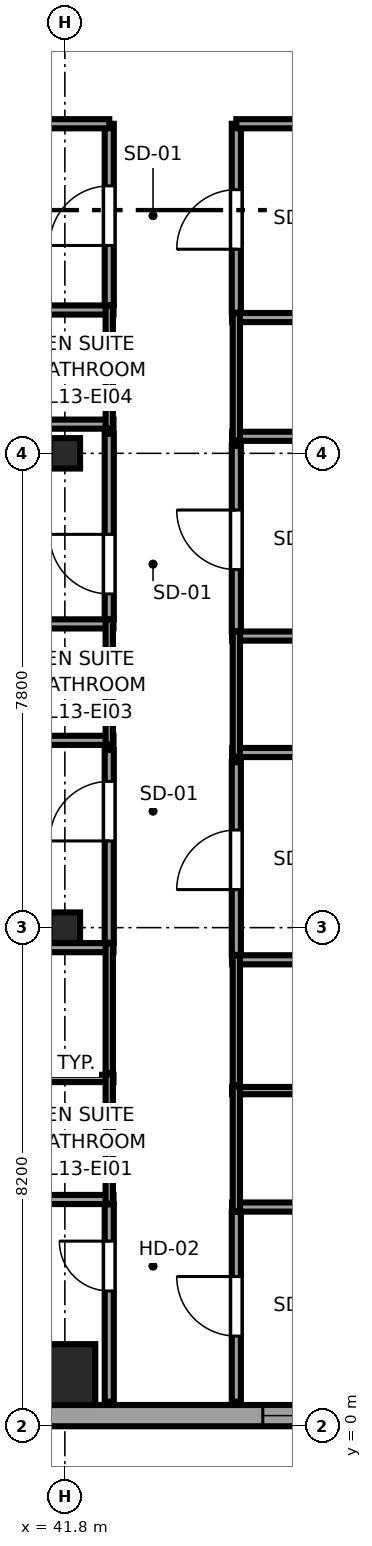
"""IFC4 building model, lengths in metres.
Left out: names, types, materials, properties, quantities, classifications, styles, units other than length and angle.
Written with IfcOpenShell. Run it as: python <this file> out.ifc"""

import sys

from ifc_helpers import new_model, si_unit, direction, frame, frame_2d, origin, origin_2d, place, context, subcontext, project, spatial, rectangle, i_section, extrude, source, transform, mapped, element, fill, save


model = new_model("IFC4")
c1 = context("Model", 3, precision=1e-05, world=origin(), true_north=direction((0.0, 1.0)))
c2 = subcontext(c1, "Body", "Model", "MODEL_VIEW")
j1 = project(units=[si_unit("LENGTHUNIT", "METRE"), si_unit("PLANEANGLEUNIT", "RADIAN")], contexts=[c1])
p1 = place(None, origin())
s1 = spatial("IfcSite", under=j1, at=p1, CompositionType="ELEMENT")
p2 = place(p1, origin())
s2 = spatial("IfcBuilding", under=s1, at=p2, CompositionType="ELEMENT")
p3 = place(p2, frame((0.0, 0.0, 56.85)))
s3 = spatial("IfcBuildingStorey", under=s2, at=p3, CompositionType="ELEMENT", Elevation=56.85)
m1 = source(origin(), c2, "Body", "SweptSolid", [
    extrude(rectangle(XDim=1.0, YDim=1.0, at=origin_2d()), origin(), (0.0, 0.0, 1.0), 3.55),
])
p4 = place(p3, frame((41.8, 0.85, 0.0), z_axis=(0.0, 0.0, 1.0), x_axis=(1.0, 0.0, 0.0)))
e1 = element("IfcColumn", 1, at=p4, inside=s3, PredefinedType="COLUMN", context=c2, shape_type="MappedRepresentation", body=[
    mapped(m1, transform((0.0, 0.0, 0.0), x_axis=(1.0, 0.0, 0.0), y_axis=(0.0, 1.0, 0.0), z_axis=(0.0, 0.0, 1.0), scale=1.0)),
])
m2 = source(origin(), c2, "Body", "SweptSolid", [
    extrude(i_section(OverallWidth=0.5, OverallDepth=0.5, WebThickness=0.028, FlangeThickness=0.045, at=origin_2d()), origin(), (0.0, 0.0, 1.0), 3.55),
])
for number, where, z_axis, x_axis in (
    (2, (41.8, 8.2, 0.0), (0.0, 0.0, 1.0), (1.0, 0.0, 0.0)),
    (3, (41.8, 16.0, 0.0), (0.0, 0.0, 1.0), (1.0, 0.0, 0.0)),
):
    element("IfcColumn", number, at=place(p3, frame(where, z_axis=z_axis, x_axis=x_axis)), inside=s3, PredefinedType="COLUMN", context=c2, shape_type="MappedRepresentation", body=[
        mapped(m2, transform((0.0, 0.0, 0.0), x_axis=(1.0, 0.0, 0.0), y_axis=(0.0, 1.0, 0.0), z_axis=(0.0, 0.0, 1.0), scale=1.0)),
    ])
p5 = place(p3, frame((34.375, 0.175, 0.0), z_axis=(0.0, 0.0, 1.0), x_axis=(1.0, 0.0, 0.0)))
e4 = element("IfcWall", 4, at=p5, inside=s3, PredefinedType="SOLIDWALL", context=c2, shape_type="SweptSolid", body=[
    extrude(rectangle(XDim=18.008, YDim=0.35, at=frame_2d((9.004, 0.0))), origin(), (0.0, 0.0, 1.0), 3.37),
])
p6 = place(p5, frame((1.726, 0.0, 0.68)))
e5 = element("IfcOpeningElement", 5, at=p6, cuts=e4, PredefinedType="OPENING", context=c2, shape_type="SweptSolid", body=[
    extrude(rectangle(XDim=1.95, YDim=1.82, at=frame_2d((0.975, 0.91))), frame((0.0, 0.185, 0.0), z_axis=(0.0, -1.0, 0.0), x_axis=(1.0, 0.0, 0.0)), (0.0, 0.0, 1.0), 0.37),
])
p7 = place(p5, frame((10.68, 0.0, 0.68)))
e6 = element("IfcOpeningElement", 6, at=p7, cuts=e4, PredefinedType="OPENING", context=c2, shape_type="SweptSolid", body=[
    extrude(rectangle(XDim=1.95, YDim=1.82, at=frame_2d((0.975, 0.91))), frame((0.0, 0.185, 0.0), z_axis=(0.0, -1.0, 0.0), x_axis=(1.0, 0.0, 0.0)), (0.0, 0.0, 1.0), 0.37),
])
p8 = place(p3, frame((40.01, 3.729, 0.0), z_axis=(0.0, 0.0, 1.0), x_axis=(1.0, 0.0, 0.0)))
e7 = element("IfcWall", 7, at=p8, inside=s3, PredefinedType="PARTITIONING", context=c2, shape_type="SweptSolid", body=[
    extrude(rectangle(XDim=2.59, YDim=0.15, at=frame_2d((1.295, 0.0))), origin(), (0.0, 0.0, 1.0), 3.37),
])
p9 = place(p3, frame((40.01, 5.72, 0.0), z_axis=(0.0, 0.0, 1.0), x_axis=(1.0, 0.0, 0.0)))
e8 = element("IfcWall", 8, at=p9, inside=s3, PredefinedType="PLUMBINGWALL", context=c2, shape_type="SweptSolid", body=[
    extrude(rectangle(XDim=2.59, YDim=0.12, at=frame_2d((1.295, 0.0))), origin(), (0.0, 0.0, 1.0), 3.37),
])
p10 = place(p3, frame((42.53, 3.659, 0.0), z_axis=(0.0, 0.0, 1.0), x_axis=(0.0, 1.0, 0.0)))
e9 = element("IfcWall", 9, at=p10, inside=s3, PredefinedType="PLUMBINGWALL", context=c2, shape_type="SweptSolid", body=[
    extrude(rectangle(XDim=2.131, YDim=0.12, at=frame_2d((1.065, 0.0))), origin(), (0.0, 0.0, 1.0), 3.37),
])
p11 = place(p3, frame((40.01, 7.871, 0.0), z_axis=(0.0, 0.0, 1.0), x_axis=(1.0, 0.0, 0.0)))
e10 = element("IfcWall", 10, at=p11, inside=s3, PredefinedType="PARTITIONING", context=c2, shape_type="SweptSolid", body=[
    extrude(rectangle(XDim=2.59, YDim=0.15, at=frame_2d((1.295, 0.0))), origin(), (0.0, 0.0, 1.0), 3.37),
])
p12 = place(p3, frame((42.53, 5.81, 0.0), z_axis=(0.0, 0.0, 1.0), x_axis=(0.0, 1.0, 0.0)))
e11 = element("IfcWall", 11, at=p12, inside=s3, PredefinedType="PLUMBINGWALL", context=c2, shape_type="SweptSolid", body=[
    extrude(rectangle(XDim=2.131, YDim=0.12, at=frame_2d((1.065, 0.0))), origin(), (0.0, 0.0, 1.0), 3.37),
])
p13 = place(p3, frame((34.65, 11.28, 0.0), z_axis=(0.0, 0.0, 1.0), x_axis=(1.0, 0.0, 0.0)))
e12 = element("IfcWall", 12, at=p13, inside=s3, PredefinedType="PARTITIONING", context=c2, shape_type="SweptSolid", body=[
    extrude(rectangle(XDim=7.95, YDim=0.15, at=frame_2d((3.975, 0.0))), origin(), (0.0, 0.0, 1.0), 3.37),
])
p14 = place(p3, frame((40.01, 13.195, 0.0), z_axis=(0.0, 0.0, 1.0), x_axis=(1.0, 0.0, 0.0)))
e13 = element("IfcWall", 13, at=p14, inside=s3, PredefinedType="PARTITIONING", context=c2, shape_type="SweptSolid", body=[
    extrude(rectangle(XDim=2.59, YDim=0.15, at=frame_2d((1.295, 0.0))), origin(), (0.0, 0.0, 1.0), 3.37),
])
p15 = place(p3, frame((42.53, 11.21, 0.0), z_axis=(0.0, 0.0, 1.0), x_axis=(0.0, 1.0, 0.0)))
e14 = element("IfcWall", 14, at=p15, inside=s3, PredefinedType="PLUMBINGWALL", context=c2, shape_type="SweptSolid", body=[
    extrude(rectangle(XDim=2.055, YDim=0.12, at=frame_2d((1.027, 0.0))), origin(), (0.0, 0.0, 1.0), 3.37),
])
p16 = place(p3, frame((34.65, 16.48, 0.0), z_axis=(0.0, 0.0, 1.0), x_axis=(1.0, 0.0, 0.0)))
e15 = element("IfcWall", 15, at=p16, inside=s3, PredefinedType="PARTITIONING", context=c2, shape_type="SweptSolid", body=[
    extrude(rectangle(XDim=7.95, YDim=0.15, at=frame_2d((3.975, 0.0))), origin(), (0.0, 0.0, 1.0), 3.37),
])
p17 = place(p3, frame((40.01, 18.357, 0.0), z_axis=(0.0, 0.0, 1.0), x_axis=(1.0, 0.0, 0.0)))
e16 = element("IfcWall", 16, at=p17, inside=s3, PredefinedType="PARTITIONING", context=c2, shape_type="SweptSolid", body=[
    extrude(rectangle(XDim=2.59, YDim=0.15, at=frame_2d((1.295, 0.0))), origin(), (0.0, 0.0, 1.0), 3.37),
])
p18 = place(p3, frame((42.53, 16.41, 0.0), z_axis=(0.0, 0.0, 1.0), x_axis=(0.0, 1.0, 0.0)))
e17 = element("IfcWall", 17, at=p18, inside=s3, PredefinedType="PLUMBINGWALL", context=c2, shape_type="SweptSolid", body=[
    extrude(rectangle(XDim=2.017, YDim=0.12, at=frame_2d((1.009, 0.0))), origin(), (0.0, 0.0, 1.0), 3.37),
])
p19 = place(p3, frame((44.55, 3.605, 0.0), z_axis=(0.0, 0.0, 1.0), x_axis=(1.0, 0.0, 0.0)))
e18 = element("IfcWall", 18, at=p19, inside=s3, PredefinedType="PARTITIONING", context=c2, shape_type="SweptSolid", body=[
    extrude(rectangle(XDim=2.59, YDim=0.15, at=frame_2d((1.295, 0.0))), origin(), (0.0, 0.0, 1.0), 3.37),
])
p20 = place(p3, frame((44.55, 5.52, 0.0), z_axis=(0.0, 0.0, 1.0), x_axis=(1.0, 0.0, 0.0)))
e19 = element("IfcWall", 19, at=p20, inside=s3, PredefinedType="PLUMBINGWALL", context=c2, shape_type="SweptSolid", body=[
    extrude(rectangle(XDim=2.59, YDim=0.12, at=frame_2d((1.295, 0.0))), origin(), (0.0, 0.0, 1.0), 3.37),
])
p21 = place(p3, frame((44.62, 3.535, 0.0), z_axis=(0.0, 0.0, 1.0), x_axis=(0.0, 1.0, 0.0)))
e20 = element("IfcWall", 20, at=p21, inside=s3, PredefinedType="PLUMBINGWALL", context=c2, shape_type="SweptSolid", body=[
    extrude(rectangle(XDim=2.055, YDim=0.12, at=frame_2d((1.028, 0.0))), origin(), (0.0, 0.0, 1.0), 3.37),
])
p22 = place(p3, frame((44.55, 7.671, 0.0), z_axis=(0.0, 0.0, 1.0), x_axis=(1.0, 0.0, 0.0)))
e21 = element("IfcWall", 21, at=p22, inside=s3, PredefinedType="PARTITIONING", context=c2, shape_type="SweptSolid", body=[
    extrude(rectangle(XDim=2.59, YDim=0.15, at=frame_2d((1.295, 0.0))), origin(), (0.0, 0.0, 1.0), 3.37),
])
p23 = place(p3, frame((44.62, 5.61, 0.0), z_axis=(0.0, 0.0, 1.0), x_axis=(0.0, 1.0, 0.0)))
e22 = element("IfcWall", 22, at=p23, inside=s3, PredefinedType="PLUMBINGWALL", context=c2, shape_type="SweptSolid", body=[
    extrude(rectangle(XDim=2.131, YDim=0.12, at=frame_2d((1.065, 0.0))), origin(), (0.0, 0.0, 1.0), 3.37),
])
p24 = place(p3, frame((44.55, 11.08, 0.0), z_axis=(0.0, 0.0, 1.0), x_axis=(1.0, 0.0, 0.0)))
e23 = element("IfcWall", 23, at=p24, inside=s3, PredefinedType="PARTITIONING", context=c2, shape_type="SweptSolid", body=[
    extrude(rectangle(XDim=12.045, YDim=0.15, at=frame_2d((6.022, 0.0))), origin(), (0.0, 0.0, 1.0), 3.37),
])
p25 = place(p3, frame((44.55, 12.995, 0.0), z_axis=(0.0, 0.0, 1.0), x_axis=(1.0, 0.0, 0.0)))
e24 = element("IfcWall", 24, at=p25, inside=s3, PredefinedType="PARTITIONING", context=c2, shape_type="SweptSolid", body=[
    extrude(rectangle(XDim=2.59, YDim=0.15, at=frame_2d((1.295, 0.0))), origin(), (0.0, 0.0, 1.0), 3.37),
])
p26 = place(p3, frame((44.62, 11.01, 0.0), z_axis=(0.0, 0.0, 1.0), x_axis=(0.0, 1.0, 0.0)))
e25 = element("IfcWall", 25, at=p26, inside=s3, PredefinedType="PLUMBINGWALL", context=c2, shape_type="SweptSolid", body=[
    extrude(rectangle(XDim=2.055, YDim=0.12, at=frame_2d((1.027, 0.0))), origin(), (0.0, 0.0, 1.0), 3.37),
])
p27 = place(p3, frame((44.55, 16.28, 0.0), z_axis=(0.0, 0.0, 1.0), x_axis=(1.0, 0.0, 0.0)))
e26 = element("IfcWall", 26, at=p27, inside=s3, PredefinedType="PARTITIONING", context=c2, shape_type="SweptSolid", body=[
    extrude(rectangle(XDim=12.045, YDim=0.15, at=frame_2d((6.022, 0.0))), origin(), (0.0, 0.0, 1.0), 3.37),
])
p28 = place(p3, frame((44.55, 18.233, 0.0), z_axis=(0.0, 0.0, 1.0), x_axis=(1.0, 0.0, 0.0)))
e27 = element("IfcWall", 27, at=p28, inside=s3, PredefinedType="PARTITIONING", context=c2, shape_type="SweptSolid", body=[
    extrude(rectangle(XDim=2.59, YDim=0.15, at=frame_2d((1.295, 0.0))), origin(), (0.0, 0.0, 1.0), 3.37),
])
p29 = place(p3, frame((44.62, 16.21, 0.0), z_axis=(0.0, 0.0, 1.0), x_axis=(0.0, 1.0, 0.0)))
e28 = element("IfcWall", 28, at=p29, inside=s3, PredefinedType="PLUMBINGWALL", context=c2, shape_type="SweptSolid", body=[
    extrude(rectangle(XDim=2.093, YDim=0.12, at=frame_2d((1.046, 0.0))), origin(), (0.0, 0.0, 1.0), 3.37),
])
p30 = place(p3, frame((42.53, 0.405, 0.0), z_axis=(0.0, 0.0, 1.0), x_axis=(0.0, 1.0, 0.0)))
e29 = element("IfcWall", 29, at=p30, inside=s3, PredefinedType="PARTITIONING", context=c2, shape_type="SweptSolid", body=[
    extrude(rectangle(XDim=3.244, YDim=0.15, at=frame_2d((1.622, 0.0))), origin(), (0.0, 0.0, 1.0), 3.37),
])
p31 = place(p30, frame((1.82, 0.0, 0.0)))
e30 = element("IfcOpeningElement", 30, at=p31, cuts=e29, PredefinedType="OPENING", context=c2, shape_type="SweptSolid", body=[
    extrude(rectangle(XDim=0.82, YDim=2.01, at=frame_2d((0.41, 1.005))), frame((0.0, 0.085, 0.0), z_axis=(0.0, -1.0, 0.0), x_axis=(1.0, 0.0, 0.0)), (0.0, 0.0, 1.0), 0.17),
])
p32 = place(p3, frame((42.53, 7.951, 0.0), z_axis=(0.0, 0.0, 1.0), x_axis=(0.0, 1.0, 0.0)))
e31 = element("IfcWall", 31, at=p32, inside=s3, PredefinedType="PARTITIONING", context=c2, shape_type="SweptSolid", body=[
    extrude(rectangle(XDim=3.169, YDim=0.15, at=frame_2d((1.584, 0.0))), origin(), (0.0, 0.0, 1.0), 3.37),
])
p33 = place(p32, frame((1.675, 0.0, 0.0)))
e32 = element("IfcOpeningElement", 32, at=p33, cuts=e31, PredefinedType="OPENING", context=c2, shape_type="SweptSolid", body=[
    extrude(rectangle(XDim=0.98, YDim=2.12, at=frame_2d((0.49, 1.06))), frame((0.0, 0.085, 0.0), z_axis=(0.0, -1.0, 0.0), x_axis=(1.0, 0.0, 0.0)), (0.0, 0.0, 1.0), 0.17),
])
p34 = place(p3, frame((42.53, 13.275, 0.0), z_axis=(0.0, 0.0, 1.0), x_axis=(0.0, 1.0, 0.0)))
e33 = element("IfcWall", 33, at=p34, inside=s3, PredefinedType="PARTITIONING", context=c2, shape_type="SweptSolid", body=[
    extrude(rectangle(XDim=3.045, YDim=0.15, at=frame_2d((1.522, 0.0))), origin(), (0.0, 0.0, 1.0), 3.37),
])
p35 = place(p34, frame((0.413, 0.0, 0.0)))
e34 = element("IfcOpeningElement", 34, at=p35, cuts=e33, PredefinedType="OPENING", context=c2, shape_type="SweptSolid", body=[
    extrude(rectangle(XDim=0.98, YDim=2.12, at=frame_2d((0.49, 1.06))), frame((0.0, 0.085, 0.0), z_axis=(0.0, -1.0, 0.0), x_axis=(1.0, 0.0, 0.0)), (0.0, 0.0, 1.0), 0.17),
])
p36 = place(p3, frame((42.53, 18.437, 0.0), z_axis=(0.0, 0.0, 1.0), x_axis=(0.0, 1.0, 0.0)))
e35 = element("IfcWall", 35, at=p36, inside=s3, PredefinedType="PARTITIONING", context=c2, shape_type="SweptSolid", body=[
    extrude(rectangle(XDim=2.983, YDim=0.15, at=frame_2d((1.491, 0.0))), origin(), (0.0, 0.0, 1.0), 3.37),
])
p37 = place(p36, frame((0.981, 0.0, 0.0)))
e36 = element("IfcOpeningElement", 36, at=p37, cuts=e35, PredefinedType="OPENING", context=c2, shape_type="SweptSolid", body=[
    extrude(rectangle(XDim=0.98, YDim=2.12, at=frame_2d((0.49, 1.06))), frame((0.0, 0.085, 0.0), z_axis=(0.0, -1.0, 0.0), x_axis=(1.0, 0.0, 0.0)), (0.0, 0.0, 1.0), 0.17),
])
p38 = place(p3, frame((34.65, 21.42, 0.0), z_axis=(0.0, 0.0, 1.0), x_axis=(1.0, 0.0, 0.0)))
e37 = element("IfcWall", 37, at=p38, inside=s3, PredefinedType="PARTITIONING", context=c2, shape_type="SweptSolid", body=[
    extrude(rectangle(XDim=7.88, YDim=0.15, at=frame_2d((3.94, 0.0))), origin(), (0.0, 0.0, 1.0), 3.37),
])
p39 = place(p3, frame((44.62, 0.405, 0.0), z_axis=(0.0, 0.0, 1.0), x_axis=(0.0, 1.0, 0.0)))
e38 = element("IfcWall", 38, at=p39, inside=s3, PredefinedType="PARTITIONING", context=c2, shape_type="SweptSolid", body=[
    extrude(rectangle(XDim=3.12, YDim=0.15, at=frame_2d((1.56, 0.0))), origin(), (0.0, 0.0, 1.0), 3.37),
])
p40 = place(p39, frame((1.077, 0.0, 0.0)))
e39 = element("IfcOpeningElement", 39, at=p40, cuts=e38, PredefinedType="OPENING", context=c2, shape_type="SweptSolid", body=[
    extrude(rectangle(XDim=0.98, YDim=2.12, at=frame_2d((0.49, 1.06))), frame((0.0, 0.085, 0.0), z_axis=(0.0, -1.0, 0.0), x_axis=(1.0, 0.0, 0.0)), (0.0, 0.0, 1.0), 0.17),
])
p41 = place(p3, frame((44.62, 7.751, 0.0), z_axis=(0.0, 0.0, 1.0), x_axis=(0.0, 1.0, 0.0)))
e40 = element("IfcWall", 40, at=p41, inside=s3, PredefinedType="PARTITIONING", context=c2, shape_type="SweptSolid", body=[
    extrude(rectangle(XDim=3.169, YDim=0.15, at=frame_2d((1.584, 0.0))), origin(), (0.0, 0.0, 1.0), 3.37),
])
p42 = place(p41, frame((1.074, 0.0, 0.0)))
e41 = element("IfcOpeningElement", 41, at=p42, cuts=e40, PredefinedType="OPENING", context=c2, shape_type="SweptSolid", body=[
    extrude(rectangle(XDim=0.98, YDim=2.12, at=frame_2d((0.49, 1.06))), frame((0.0, 0.085, 0.0), z_axis=(0.0, -1.0, 0.0), x_axis=(1.0, 0.0, 0.0)), (0.0, 0.0, 1.0), 0.17),
])
p43 = place(p3, frame((44.62, 13.075, 0.0), z_axis=(0.0, 0.0, 1.0), x_axis=(0.0, 1.0, 0.0)))
e42 = element("IfcWall", 42, at=p43, inside=s3, PredefinedType="PARTITIONING", context=c2, shape_type="SweptSolid", body=[
    extrude(rectangle(XDim=3.045, YDim=0.15, at=frame_2d((1.522, 0.0))), origin(), (0.0, 0.0, 1.0), 3.37),
])
p44 = place(p43, frame((1.012, 0.0, 0.0)))
e43 = element("IfcOpeningElement", 43, at=p44, cuts=e42, PredefinedType="OPENING", context=c2, shape_type="SweptSolid", body=[
    extrude(rectangle(XDim=0.98, YDim=2.12, at=frame_2d((0.49, 1.06))), frame((0.0, 0.085, 0.0), z_axis=(0.0, -1.0, 0.0), x_axis=(1.0, 0.0, 0.0)), (0.0, 0.0, 1.0), 0.17),
])
p45 = place(p3, frame((44.62, 18.313, 0.0), z_axis=(0.0, 0.0, 1.0), x_axis=(0.0, 1.0, 0.0)))
e44 = element("IfcWall", 44, at=p45, inside=s3, PredefinedType="PARTITIONING", context=c2, shape_type="SweptSolid", body=[
    extrude(rectangle(XDim=3.107, YDim=0.15, at=frame_2d((1.553, 0.0))), origin(), (0.0, 0.0, 1.0), 3.37),
])
p46 = place(p45, frame((1.043, 0.0, 0.0)))
e45 = element("IfcOpeningElement", 45, at=p46, cuts=e44, PredefinedType="OPENING", context=c2, shape_type="SweptSolid", body=[
    extrude(rectangle(XDim=0.98, YDim=2.12, at=frame_2d((0.49, 1.06))), frame((0.0, 0.085, 0.0), z_axis=(0.0, -1.0, 0.0), x_axis=(1.0, 0.0, 0.0)), (0.0, 0.0, 1.0), 0.17),
])
p47 = place(p3, frame((44.62, 21.42, 0.0), z_axis=(0.0, 0.0, 1.0), x_axis=(1.0, 0.0, 0.0)))
e46 = element("IfcWall", 46, at=p47, inside=s3, PredefinedType="PARTITIONING", context=c2, shape_type="SweptSolid", body=[
    extrude(rectangle(XDim=11.975, YDim=0.15, at=frame_2d((5.987, 0.0))), origin(), (0.0, 0.0, 1.0), 3.37),
])
m3 = source(origin(), c2, "Body", "SweptSolid", [
    extrude(rectangle(XDim=1.95, YDim=1.82, at=frame_2d((0.975, 0.91))), frame((0.0, 0.09, 0.0), z_axis=(0.0, -1.0, 0.0), x_axis=(1.0, 0.0, 0.0)), (0.0, 0.0, 1.0), 0.06),
])
p48 = place(p7, origin())
e47 = element("IfcWindow", 47, at=p48, inside=s3, PartitioningType="DOUBLE_PANEL_VERTICAL", PredefinedType="WINDOW", context=c2, shape_type="MappedRepresentation", body=[
    mapped(m3, transform((0.0, 0.0, 0.0), x_axis=(1.0, 0.0, 0.0), y_axis=(0.0, 1.0, 0.0), z_axis=(0.0, 0.0, 1.0), scale=1.0)),
])
fill(e6, e47)
m4 = source(origin(), c2, "Body", "SweptSolid", [
    extrude(rectangle(XDim=0.82, YDim=2.01, at=frame_2d((0.41, 1.005))), frame((0.0, 0.025, 0.0), z_axis=(0.0, -1.0, 0.0), x_axis=(1.0, 0.0, 0.0)), (0.0, 0.0, 1.0), 0.05),
])
p49 = place(p31, origin())
e48 = element("IfcDoor", 48, at=p49, inside=s3, OperationType="SINGLE_SWING_RIGHT", PredefinedType="DOOR", context=c2, shape_type="MappedRepresentation", body=[
    mapped(m4, transform((0.0, 0.0, 0.0), x_axis=(1.0, 0.0, 0.0), y_axis=(0.0, 1.0, 0.0), z_axis=(0.0, 0.0, 1.0), scale=1.0)),
])
fill(e30, e48)
m5 = source(origin(), c2, "Body", "SweptSolid", [
    extrude(rectangle(XDim=0.98, YDim=2.12, at=frame_2d((0.49, 1.06))), frame((0.0, 0.025, 0.0), z_axis=(0.0, -1.0, 0.0), x_axis=(1.0, 0.0, 0.0)), (0.0, 0.0, 1.0), 0.05),
])
p50 = place(p33, origin())
e49 = element("IfcDoor", 49, at=p50, inside=s3, OperationType="SINGLE_SWING_LEFT", PredefinedType="DOOR", context=c2, shape_type="MappedRepresentation", body=[
    mapped(m5, transform((0.0, 0.0, 0.0), x_axis=(1.0, 0.0, 0.0), y_axis=(0.0, 1.0, 0.0), z_axis=(0.0, 0.0, 1.0), scale=1.0)),
])
fill(e32, e49)
p51 = place(p35, origin())
e50 = element("IfcDoor", 50, at=p51, inside=s3, OperationType="SINGLE_SWING_RIGHT", PredefinedType="DOOR", context=c2, shape_type="MappedRepresentation", body=[
    mapped(m5, transform((0.0, 0.0, 0.0), x_axis=(1.0, 0.0, 0.0), y_axis=(0.0, 1.0, 0.0), z_axis=(0.0, 0.0, 1.0), scale=1.0)),
])
fill(e34, e50)
p52 = place(p37, origin())
e51 = element("IfcDoor", 51, at=p52, inside=s3, OperationType="SINGLE_SWING_LEFT", PredefinedType="DOOR", context=c2, shape_type="MappedRepresentation", body=[
    mapped(m5, transform((0.0, 0.0, 0.0), x_axis=(1.0, 0.0, 0.0), y_axis=(0.0, 1.0, 0.0), z_axis=(0.0, 0.0, 1.0), scale=1.0)),
])
fill(e36, e51)
p53 = place(p40, origin())
e52 = element("IfcDoor", 52, at=p53, inside=s3, OperationType="SINGLE_SWING_RIGHT", PredefinedType="DOOR", context=c2, shape_type="MappedRepresentation", body=[
    mapped(m5, transform((0.0, 0.0, 0.0), x_axis=(1.0, 0.0, 0.0), y_axis=(0.0, 1.0, 0.0), z_axis=(0.0, 0.0, 1.0), scale=1.0)),
])
fill(e39, e52)
p54 = place(p42, origin())
e53 = element("IfcDoor", 53, at=p54, inside=s3, OperationType="SINGLE_SWING_LEFT", PredefinedType="DOOR", context=c2, shape_type="MappedRepresentation", body=[
    mapped(m5, transform((0.0, 0.0, 0.0), x_axis=(1.0, 0.0, 0.0), y_axis=(0.0, 1.0, 0.0), z_axis=(0.0, 0.0, 1.0), scale=1.0)),
])
fill(e41, e53)
p55 = place(p44, origin())
e54 = element("IfcDoor", 54, at=p55, inside=s3, OperationType="SINGLE_SWING_RIGHT", PredefinedType="DOOR", context=c2, shape_type="MappedRepresentation", body=[
    mapped(m5, transform((0.0, 0.0, 0.0), x_axis=(1.0, 0.0, 0.0), y_axis=(0.0, 1.0, 0.0), z_axis=(0.0, 0.0, 1.0), scale=1.0)),
])
fill(e43, e54)
p56 = place(p46, origin())
e55 = element("IfcDoor", 55, at=p56, inside=s3, OperationType="SINGLE_SWING_LEFT", PredefinedType="DOOR", context=c2, shape_type="MappedRepresentation", body=[
    mapped(m5, transform((0.0, 0.0, 0.0), x_axis=(1.0, 0.0, 0.0), y_axis=(0.0, 1.0, 0.0), z_axis=(0.0, 0.0, 1.0), scale=1.0)),
])
fill(e45, e55)
save(model, sys.argv[1])
